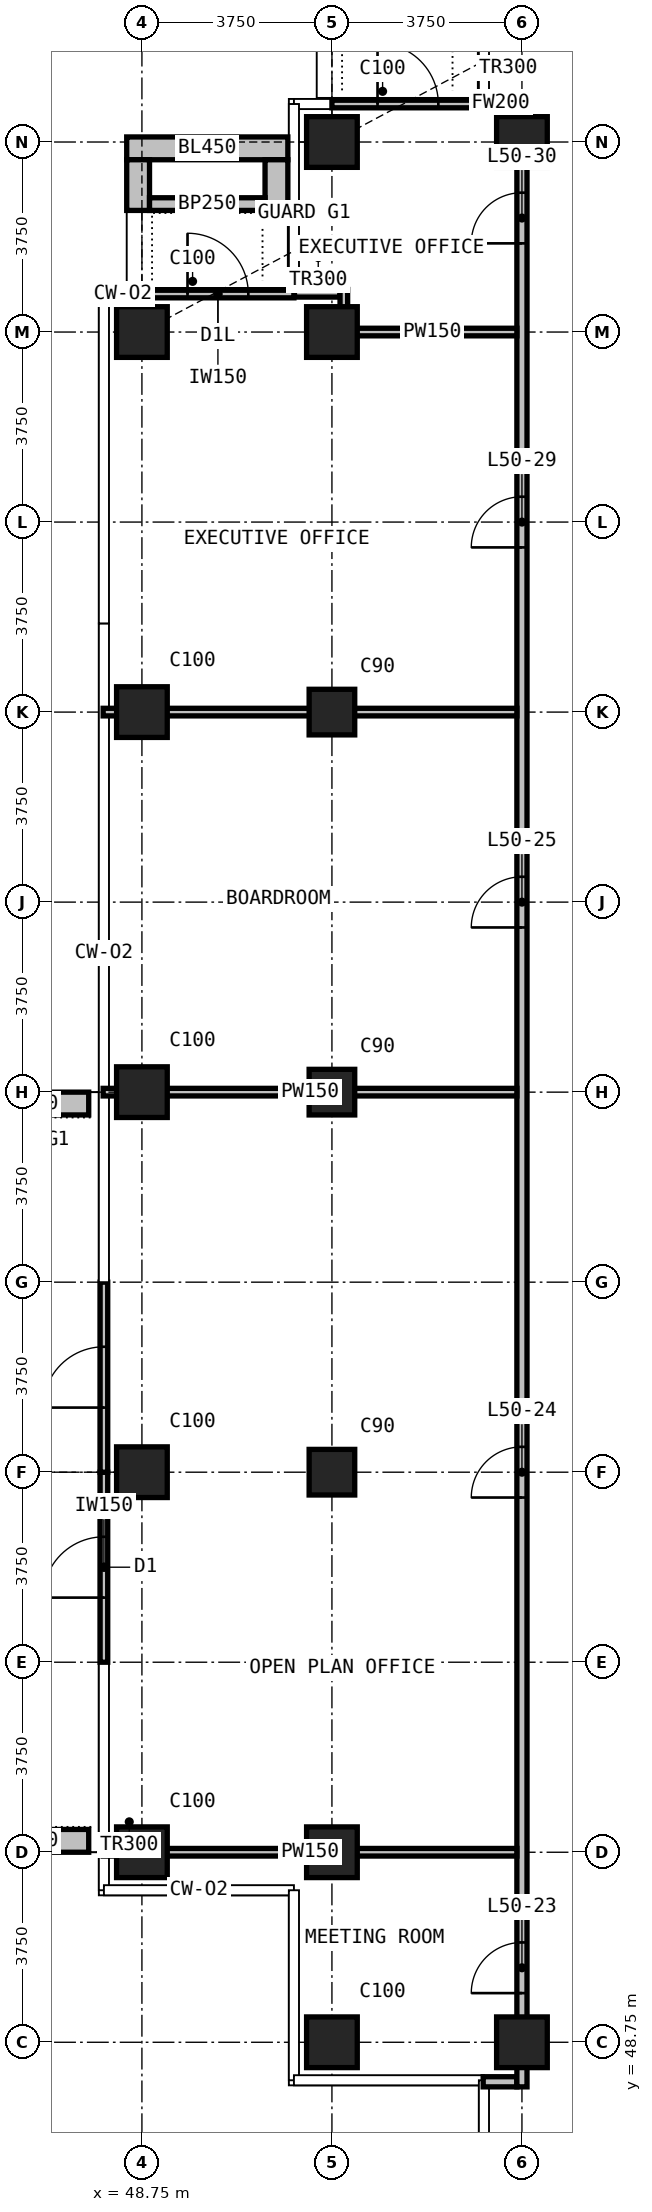
"""IFC4 building model, lengths in metres.
Left out: names, types, materials, properties, quantities, classifications, styles, units other than length and angle.
Written with IfcOpenShell. Run it as: python <this file> out.ifc"""

import sys

from ifc_helpers import new_model, si_unit, direction, frame, frame_2d, origin, origin_2d, place, context, subcontext, project, spatial, rectangle, extrude, element, fill, save


model = new_model("IFC4")
c1 = context("Model", 3, precision=1e-05, world=origin(), true_north=direction((0.0, 1.0)))
c2 = subcontext(c1, "Body", "Model", "MODEL_VIEW")
j1 = project(units=[si_unit("LENGTHUNIT", "METRE"), si_unit("PLANEANGLEUNIT", "RADIAN")], contexts=[c1])
p1 = place(None, origin())
s1 = spatial("IfcSite", under=j1, at=p1, CompositionType="ELEMENT")
p2 = place(p1, origin())
s2 = spatial("IfcBuilding", under=s1, at=p2, CompositionType="ELEMENT")
p3 = place(p2, frame((0.0, 0.0, 195.9)))
s3 = spatial("IfcBuildingStorey", under=s2, at=p3, CompositionType="ELEMENT", Elevation=195.9)
for number, where, z_axis, x_axis in (
    (1, (48.75, 52.5, 0.0), (0.0, 0.0, 1.0), (1.0, 0.0, 0.0)),
    (2, (48.75, 60.0, 0.0), (0.0, 0.0, 1.0), (1.0, 0.0, 0.0)),
    (3, (48.75, 67.5, 0.0), (0.0, 0.0, 1.0), (1.0, 0.0, 0.0)),
    (4, (48.75, 75.0, 0.0), (0.0, 0.0, 1.0), (1.0, 0.0, 0.0)),
    (5, (48.75, 82.5, 0.0), (0.0, 0.0, 1.0), (1.0, 0.0, 0.0)),
    (6, (52.5, 48.75, 0.0), (0.0, 0.0, 1.0), (1.0, 0.0, 0.0)),
    (7, (52.5, 52.5, 0.0), (0.0, 0.0, 1.0), (1.0, 0.0, 0.0)),
):
    element("IfcColumn", number, at=place(p3, frame(where, z_axis=z_axis, x_axis=x_axis)), inside=s3, PredefinedType="COLUMN", context=c2, shape_type="SweptSolid", body=[
        extrude(rectangle(XDim=1.0, YDim=1.0, at=origin_2d()), origin(), (0.0, 0.0, 1.0), 3.6),
    ])
for number, where, z_axis, x_axis in (
    (8, (52.5, 60.0, 0.0), (0.0, 0.0, 1.0), (1.0, 0.0, 0.0)),
    (9, (52.5, 67.5, 0.0), (0.0, 0.0, 1.0), (1.0, 0.0, 0.0)),
    (10, (52.5, 75.0, 0.0), (0.0, 0.0, 1.0), (1.0, 0.0, 0.0)),
):
    element("IfcColumn", number, at=place(p3, frame(where, z_axis=z_axis, x_axis=x_axis)), inside=s3, PredefinedType="COLUMN", context=c2, shape_type="SweptSolid", body=[
        extrude(rectangle(XDim=0.9, YDim=0.9, at=origin_2d()), origin(), (0.0, 0.0, 1.0), 3.6),
    ])
for number, where, z_axis, x_axis in (
    (11, (52.5, 82.5, 0.0), (0.0, 0.0, 1.0), (1.0, 0.0, 0.0)),
    (12, (52.5, 86.25, 0.0), (0.0, 0.0, 1.0), (1.0, 0.0, 0.0)),
    (13, (56.25, 48.75, 0.0), (0.0, 0.0, 1.0), (1.0, 0.0, 0.0)),
    (14, (56.25, 86.25, 0.0), (0.0, 0.0, 1.0), (1.0, 0.0, 0.0)),
):
    element("IfcColumn", number, at=place(p3, frame(where, z_axis=z_axis, x_axis=x_axis)), inside=s3, PredefinedType="COLUMN", context=c2, shape_type="SweptSolid", body=[
        extrude(rectangle(XDim=1.0, YDim=1.0, at=origin_2d()), origin(), (0.0, 0.0, 1.0), 3.6),
    ])
p4 = place(p3, frame((52.5, 87.0, 0.0), z_axis=(0.0, 0.0, 1.0), x_axis=(1.0, 0.0, 0.0)))
e15 = element("IfcWall", 15, at=p4, inside=s3, PredefinedType="SOLIDWALL", context=c2, shape_type="SweptSolid", body=[
    extrude(rectangle(XDim=3.0, YDim=0.15, at=frame_2d((1.5, 0.0))), origin(), (0.0, 0.0, 1.0), 3.3),
])
p5 = place(p4, frame((0.9, 0.0, 0.0)))
e16 = element("IfcOpeningElement", 16, at=p5, cuts=e15, PredefinedType="OPENING", context=c2, shape_type="SweptSolid", body=[
    extrude(rectangle(XDim=1.2, YDim=2.0, at=frame_2d((0.6, 1.0))), frame((0.0, 0.085, 0.0), z_axis=(0.0, -1.0, 0.0), x_axis=(1.0, 0.0, 0.0)), (0.0, 0.0, 1.0), 0.17),
])
p6 = place(p3, frame((48.75, 83.25, 0.0), z_axis=(0.0, 0.0, 1.0), x_axis=(1.0, 0.0, 0.0)))
e17 = element("IfcWall", 17, at=p6, inside=s3, PredefinedType="SOLIDWALL", context=c2, shape_type="SweptSolid", body=[
    extrude(rectangle(XDim=3.0, YDim=0.15, at=frame_2d((1.5, 0.0))), origin(), (0.0, 0.0, 1.0), 3.3),
])
p7 = place(p6, frame((0.9, 0.0, 0.0)))
e18 = element("IfcOpeningElement", 18, at=p7, cuts=e17, PredefinedType="OPENING", context=c2, shape_type="SweptSolid", body=[
    extrude(rectangle(XDim=1.2, YDim=2.0, at=frame_2d((0.6, 1.0))), frame((0.0, 0.085, 0.0), z_axis=(0.0, -1.0, 0.0), x_axis=(1.0, 0.0, 0.0)), (0.0, 0.0, 1.0), 0.17),
])
p8 = place(p3, frame((48.0, 56.25, 0.0), z_axis=(0.0, 0.0, 1.0), x_axis=(0.0, 1.0, 0.0)))
e19 = element("IfcWall", 19, at=p8, inside=s3, PredefinedType="SOLIDWALL", context=c2, shape_type="SweptSolid", body=[
    extrude(rectangle(XDim=3.75, YDim=0.15, at=frame_2d((1.875, 0.0))), origin(), (0.0, 0.0, 1.0), 3.3),
])
p9 = place(p8, frame((1.275, 0.0, 0.0)))
e20 = element("IfcOpeningElement", 20, at=p9, cuts=e19, PredefinedType="OPENING", context=c2, shape_type="SweptSolid", body=[
    extrude(rectangle(XDim=1.2, YDim=2.4, at=frame_2d((0.6, 1.2))), frame((0.0, 0.085, 0.0), z_axis=(0.0, -1.0, 0.0), x_axis=(1.0, 0.0, 0.0)), (0.0, 0.0, 1.0), 0.17),
])
p10 = place(p3, frame((48.0, 60.0, 0.0), z_axis=(0.0, 0.0, 1.0), x_axis=(0.0, 1.0, 0.0)))
e21 = element("IfcWall", 21, at=p10, inside=s3, PredefinedType="SOLIDWALL", context=c2, shape_type="SweptSolid", body=[
    extrude(rectangle(XDim=3.75, YDim=0.15, at=frame_2d((1.875, 0.0))), origin(), (0.0, 0.0, 1.0), 3.3),
])
p11 = place(p10, frame((1.275, 0.0, 0.0)))
e22 = element("IfcOpeningElement", 22, at=p11, cuts=e21, PredefinedType="OPENING", context=c2, shape_type="SweptSolid", body=[
    extrude(rectangle(XDim=1.2, YDim=2.4, at=frame_2d((0.6, 1.2))), frame((0.0, 0.085, 0.0), z_axis=(0.0, -1.0, 0.0), x_axis=(1.0, 0.0, 0.0)), (0.0, 0.0, 1.0), 0.17),
])
p12 = place(p3, frame((48.45, 86.125, 0.0), z_axis=(0.0, 0.0, 1.0), x_axis=(1.0, 0.0, 0.0)))
e23 = element("IfcWall", 23, at=p12, inside=s3, PredefinedType="USERDEFINED", context=c2, shape_type="SweptSolid", body=[
    extrude(rectangle(XDim=3.18, YDim=0.45, at=frame_2d((1.59, 0.0))), origin(), (0.0, 0.0, 1.0), 1.1),
])
for number, where, z_axis, x_axis in (
    (24, (48.675, 84.9, 0.0), (0.0, 0.0, 1.0), (0.0, 1.0, 0.0)),
    (25, (51.405, 84.9, 0.0), (0.0, 0.0, 1.0), (0.0, 1.0, 0.0)),
):
    element("IfcWall", number, at=place(p3, frame(where, z_axis=z_axis, x_axis=x_axis)), inside=s3, PredefinedType="USERDEFINED", context=c2, shape_type="SweptSolid", body=[
        extrude(rectangle(XDim=1.0, YDim=0.45, at=frame_2d((0.5, 0.0))), origin(), (0.0, 0.0, 1.0), 1.1),
    ])
p13 = place(p3, frame((48.9, 85.025, 0.0), z_axis=(0.0, 0.0, 1.0), x_axis=(1.0, 0.0, 0.0)))
e26 = element("IfcWall", 26, at=p13, inside=s3, PredefinedType="USERDEFINED", context=c2, shape_type="SweptSolid", body=[
    extrude(rectangle(XDim=2.28, YDim=0.25, at=frame_2d((1.14, 0.0))), origin(), (0.0, 0.0, 1.0), 1.0),
])
for number, where, z_axis, x_axis in (
    (27, (47.7, 52.725, 0.0), (0.0, 0.0, 1.0), (-1.0, 0.0, 0.0)),
    (28, (47.7, 67.275, 0.0), (0.0, 0.0, 1.0), (-1.0, 0.0, 0.0)),
):
    element("IfcWall", number, at=place(p3, frame(where, z_axis=z_axis, x_axis=x_axis)), inside=s3, PredefinedType="USERDEFINED", context=c2, shape_type="SweptSolid", body=[
        extrude(rectangle(XDim=2.35, YDim=0.45, at=frame_2d((1.175, 0.0))), origin(), (0.0, 0.0, 1.0), 1.1),
    ])
p14 = place(p3, frame((55.485, 47.97, 0.0), z_axis=(0.0, 0.0, 1.0), x_axis=(1.0, 0.0, 0.0)))
e29 = element("IfcWall", 29, at=p14, inside=s3, PredefinedType="PARTITIONING", context=c2, shape_type="SweptSolid", body=[
    extrude(rectangle(XDim=0.665, YDim=0.2, at=frame_2d((0.333, 0.0))), origin(), (0.0, 0.0, 1.0), 3.3),
])
p15 = place(p3, frame((55.51, 87.03, 0.0), z_axis=(0.0, 0.0, 1.0), x_axis=(1.0, 0.0, 0.0)))
e30 = element("IfcWall", 30, at=p15, inside=s3, PredefinedType="PARTITIONING", context=c2, shape_type="SweptSolid", body=[
    extrude(rectangle(XDim=0.64, YDim=0.2, at=frame_2d((0.32, 0.0))), origin(), (0.0, 0.0, 1.0), 3.3),
])
p16 = place(p3, frame((56.25, 47.87, 0.0), z_axis=(0.0, 0.0, 1.0), x_axis=(0.0, 1.0, 0.0)))
e31 = element("IfcWall", 31, at=p16, inside=s3, PredefinedType="PARTITIONING", context=c2, shape_type="SweptSolid", body=[
    extrude(rectangle(XDim=39.26, YDim=0.2, at=frame_2d((19.63, 0.0))), origin(), (0.0, 0.0, 1.0), 3.3),
])
p17 = place(p16, frame((1.85, 0.0, 0.0)))
e32 = element("IfcOpeningElement", 32, at=p17, cuts=e31, PredefinedType="OPENING", context=c2, shape_type="SweptSolid", body=[
    extrude(rectangle(XDim=1.0, YDim=2.2, at=frame_2d((0.5, 1.1))), frame((0.0, 0.11, 0.0), z_axis=(0.0, -1.0, 0.0), x_axis=(1.0, 0.0, 0.0)), (0.0, 0.0, 1.0), 0.22),
])
p18 = place(p16, frame((11.63, 0.0, 0.0)))
e33 = element("IfcOpeningElement", 33, at=p18, cuts=e31, PredefinedType="OPENING", context=c2, shape_type="SweptSolid", body=[
    extrude(rectangle(XDim=1.0, YDim=2.2, at=frame_2d((0.5, 1.1))), frame((0.0, 0.11, 0.0), z_axis=(0.0, -1.0, 0.0), x_axis=(1.0, 0.0, 0.0)), (0.0, 0.0, 1.0), 0.22),
])
p19 = place(p16, frame((22.88, 0.0, 0.0)))
e34 = element("IfcOpeningElement", 34, at=p19, cuts=e31, PredefinedType="OPENING", context=c2, shape_type="SweptSolid", body=[
    extrude(rectangle(XDim=1.0, YDim=2.2, at=frame_2d((0.5, 1.1))), frame((0.0, 0.11, 0.0), z_axis=(0.0, -1.0, 0.0), x_axis=(1.0, 0.0, 0.0)), (0.0, 0.0, 1.0), 0.22),
])
p20 = place(p16, frame((30.38, 0.0, 0.0)))
e35 = element("IfcOpeningElement", 35, at=p20, cuts=e31, PredefinedType="OPENING", context=c2, shape_type="SweptSolid", body=[
    extrude(rectangle(XDim=1.0, YDim=2.2, at=frame_2d((0.5, 1.1))), frame((0.0, 0.11, 0.0), z_axis=(0.0, -1.0, 0.0), x_axis=(1.0, 0.0, 0.0)), (0.0, 0.0, 1.0), 0.22),
])
p21 = place(p16, frame((36.38, 0.0, 0.0)))
e36 = element("IfcOpeningElement", 36, at=p21, cuts=e31, PredefinedType="OPENING", context=c2, shape_type="SweptSolid", body=[
    extrude(rectangle(XDim=1.0, YDim=2.2, at=frame_2d((0.5, 1.1))), frame((0.0, 0.11, 0.0), z_axis=(0.0, -1.0, 0.0), x_axis=(1.0, 0.0, 0.0)), (0.0, 0.0, 1.0), 0.22),
])
for number, where, z_axis, x_axis in (
    (37, (47.985, 52.5, 0.0), (0.0, 0.0, 1.0), (1.0, 0.0, 0.0)),
    (38, (47.985, 67.5, 0.0), (0.0, 0.0, 1.0), (1.0, 0.0, 0.0)),
    (39, (47.985, 75.0, 0.0), (0.0, 0.0, 1.0), (1.0, 0.0, 0.0)),
):
    element("IfcWall", number, at=place(p3, frame(where, z_axis=z_axis, x_axis=x_axis)), inside=s3, PredefinedType="PARTITIONING", context=c2, shape_type="SweptSolid", body=[
        extrude(rectangle(XDim=8.165, YDim=0.15, at=frame_2d((4.083, 0.0))), origin(), (0.0, 0.0, 1.0), 3.3),
    ])
p22 = place(p3, frame((52.81, 82.5, 0.0), z_axis=(0.0, 0.0, 1.0), x_axis=(1.0, 0.0, 0.0)))
e40 = element("IfcWall", 40, at=p22, inside=s3, PredefinedType="PARTITIONING", context=c2, shape_type="SweptSolid", body=[
    extrude(rectangle(XDim=3.34, YDim=0.15, at=frame_2d((1.67, 0.0))), origin(), (0.0, 0.0, 1.0), 3.3),
])
p23 = place(p3, frame((51.76, 83.265, 0.0), z_axis=(0.0, 0.0, 1.0), x_axis=(1.0, 0.0, 0.0)))
e41 = element("IfcWall", 41, at=p23, inside=s3, PredefinedType="PARTITIONING", context=c2, shape_type="SweptSolid", body=[
    extrude(rectangle(XDim=0.9, YDim=0.15, at=frame_2d((0.45, 0.0))), origin(), (0.0, 0.0, 1.0), 3.3),
])
p24 = place(p3, frame((52.735, 82.425, 0.0), z_axis=(0.0, 0.0, 1.0), x_axis=(0.0, 1.0, 0.0)))
e42 = element("IfcWall", 42, at=p24, inside=s3, PredefinedType="PARTITIONING", context=c2, shape_type="SweptSolid", body=[
    extrude(rectangle(XDim=0.915, YDim=0.15, at=frame_2d((0.458, 0.0))), origin(), (0.0, 0.0, 1.0), 3.3),
])
p25 = place(p5, origin())
e43 = element("IfcDoor", 43, at=p25, inside=s3, OperationType="SINGLE_SWING_LEFT", PredefinedType="DOOR", context=c2, shape_type="SweptSolid", body=[
    extrude(rectangle(XDim=1.2, YDim=2.0, at=frame_2d((0.6, 1.0))), frame((0.0, 0.025, 0.0), z_axis=(0.0, -1.0, 0.0), x_axis=(1.0, 0.0, 0.0)), (0.0, 0.0, 1.0), 0.05),
])
fill(e16, e43)
p26 = place(p7, origin())
e44 = element("IfcDoor", 44, at=p26, inside=s3, OperationType="SINGLE_SWING_LEFT", PredefinedType="DOOR", context=c2, shape_type="SweptSolid", body=[
    extrude(rectangle(XDim=1.2, YDim=2.0, at=frame_2d((0.6, 1.0))), frame((0.0, 0.025, 0.0), z_axis=(0.0, -1.0, 0.0), x_axis=(1.0, 0.0, 0.0)), (0.0, 0.0, 1.0), 0.05),
])
fill(e18, e44)
p27 = place(p9, origin())
e45 = element("IfcDoor", 45, at=p27, inside=s3, OperationType="SINGLE_SWING_LEFT", PredefinedType="DOOR", context=c2, shape_type="SweptSolid", body=[
    extrude(rectangle(XDim=1.2, YDim=2.4, at=frame_2d((0.6, 1.2))), frame((0.0, 0.025, 0.0), z_axis=(0.0, -1.0, 0.0), x_axis=(1.0, 0.0, 0.0)), (0.0, 0.0, 1.0), 0.05),
])
fill(e20, e45)
p28 = place(p11, origin())
e46 = element("IfcDoor", 46, at=p28, inside=s3, OperationType="SINGLE_SWING_LEFT", PredefinedType="DOOR", context=c2, shape_type="SweptSolid", body=[
    extrude(rectangle(XDim=1.2, YDim=2.4, at=frame_2d((0.6, 1.2))), frame((0.0, 0.025, 0.0), z_axis=(0.0, -1.0, 0.0), x_axis=(1.0, 0.0, 0.0)), (0.0, 0.0, 1.0), 0.05),
])
fill(e22, e46)
p29 = place(p17, origin())
e47 = element("IfcDoor", 47, at=p29, inside=s3, OperationType="SINGLE_SWING_LEFT", PredefinedType="DOOR", context=c2, shape_type="SweptSolid", body=[
    extrude(rectangle(XDim=1.0, YDim=2.2, at=frame_2d((0.5, 1.1))), frame((0.0, 0.025, 0.0), z_axis=(0.0, -1.0, 0.0), x_axis=(1.0, 0.0, 0.0)), (0.0, 0.0, 1.0), 0.05),
])
fill(e32, e47)
p30 = place(p18, origin())
e48 = element("IfcDoor", 48, at=p30, inside=s3, OperationType="SINGLE_SWING_RIGHT", PredefinedType="DOOR", context=c2, shape_type="SweptSolid", body=[
    extrude(rectangle(XDim=1.0, YDim=2.2, at=frame_2d((0.5, 1.1))), frame((0.0, 0.025, 0.0), z_axis=(0.0, -1.0, 0.0), x_axis=(1.0, 0.0, 0.0)), (0.0, 0.0, 1.0), 0.05),
])
fill(e33, e48)
p31 = place(p19, origin())
e49 = element("IfcDoor", 49, at=p31, inside=s3, OperationType="SINGLE_SWING_LEFT", PredefinedType="DOOR", context=c2, shape_type="SweptSolid", body=[
    extrude(rectangle(XDim=1.0, YDim=2.2, at=frame_2d((0.5, 1.1))), frame((0.0, 0.025, 0.0), z_axis=(0.0, -1.0, 0.0), x_axis=(1.0, 0.0, 0.0)), (0.0, 0.0, 1.0), 0.05),
])
fill(e34, e49)
p32 = place(p20, origin())
e50 = element("IfcDoor", 50, at=p32, inside=s3, OperationType="SINGLE_SWING_LEFT", PredefinedType="DOOR", context=c2, shape_type="SweptSolid", body=[
    extrude(rectangle(XDim=1.0, YDim=2.2, at=frame_2d((0.5, 1.1))), frame((0.0, 0.025, 0.0), z_axis=(0.0, -1.0, 0.0), x_axis=(1.0, 0.0, 0.0)), (0.0, 0.0, 1.0), 0.05),
])
fill(e35, e50)
p33 = place(p21, origin())
e51 = element("IfcDoor", 51, at=p33, inside=s3, OperationType="SINGLE_SWING_RIGHT", PredefinedType="DOOR", context=c2, shape_type="SweptSolid", body=[
    extrude(rectangle(XDim=1.0, YDim=2.2, at=frame_2d((0.5, 1.1))), frame((0.0, 0.025, 0.0), z_axis=(0.0, -1.0, 0.0), x_axis=(1.0, 0.0, 0.0)), (0.0, 0.0, 1.0), 0.05),
])
fill(e36, e51)
save(model, sys.argv[1])
